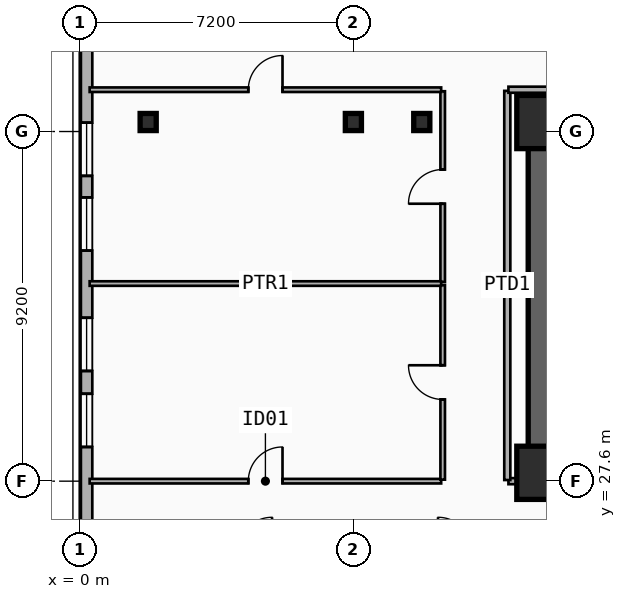
"""IFC4 building model, lengths in metres.
Left out: names, types, materials, properties, quantities, classifications, styles, units other than length and angle.
Written with IfcOpenShell. Run it as: python <this file> out.ifc"""

import sys

from ifc_helpers import new_model, si_unit, direction, frame, frame_2d, origin, origin_2d, place, context, subcontext, project, spatial, rectangle, i_section, extrude, element, fill, save


model = new_model("IFC4")
c1 = context("Model", 3, precision=1e-05, world=origin(), true_north=direction((0.0, 1.0)))
c2 = subcontext(c1, "Body", "Model", "MODEL_VIEW")
j1 = project(units=[si_unit("LENGTHUNIT", "METRE"), si_unit("PLANEANGLEUNIT", "RADIAN")], contexts=[c1])
p1 = place(None, origin())
s1 = spatial("IfcSite", under=j1, at=p1, CompositionType="ELEMENT")
p2 = place(p1, origin())
s2 = spatial("IfcBuilding", under=s1, at=p2, CompositionType="ELEMENT")
p3 = place(p2, frame((0.0, 0.0, 71.0)))
s3 = spatial("IfcBuildingStorey", under=s2, at=p3, CompositionType="ELEMENT", Elevation=71.0)
p4 = place(p3, frame((12.15, 37.05, 0.0), z_axis=(0.0, 0.0, 1.0), x_axis=(1.0, 0.0, 0.0)))
e1 = element("IfcWall", 1, at=p4, inside=s3, PredefinedType="SHEAR", context=c2, shape_type="SweptSolid", body=[
    extrude(rectangle(XDim=33.23, YDim=0.7, at=frame_2d((16.615, 0.0))), origin(), (0.0, 0.0, 1.0), 3.5),
])
p5 = place(p3, frame((21.18, 27.82, 0.0), z_axis=(0.0, 0.0, 1.0), x_axis=(-1.0, 0.0, 0.0)))
e2 = element("IfcWall", 2, at=p5, inside=s3, PredefinedType="SHEAR", context=c2, shape_type="SweptSolid", body=[
    extrude(rectangle(XDim=9.03, YDim=0.7, at=frame_2d((4.515, 0.0))), origin(), (0.0, 0.0, 1.0), 3.5),
])
p6 = place(p5, frame((2.68, 0.0, 0.0)))
e3 = element("IfcOpeningElement", 3, at=p6, cuts=e2, PredefinedType="OPENING", context=c2, shape_type="SweptSolid", body=[
    extrude(rectangle(XDim=1.1, YDim=2.15, at=frame_2d((0.55, 1.075))), frame((0.0, 0.36, 0.0), z_axis=(0.0, -1.0, 0.0), x_axis=(1.0, 0.0, 0.0)), (0.0, 0.0, 1.0), 0.72),
])
p7 = place(p3, frame((12.15, 28.17, 0.0), z_axis=(0.0, 0.0, 1.0), x_axis=(0.0, 1.0, 0.0)))
e4 = element("IfcWall", 4, at=p7, inside=s3, PredefinedType="SHEAR", context=c2, shape_type="SweptSolid", body=[
    extrude(rectangle(XDim=8.53, YDim=0.7, at=frame_2d((4.265, 0.0))), origin(), (0.0, 0.0, 1.0), 3.5),
])
for number, where, z_axis, x_axis in (
    (5, (12.2, 27.82, 0.0), (0.0, 0.0, 1.0), (1.0, 0.0, 0.0)),
    (6, (12.2, 37.05, 0.0), (0.0, 0.0, 1.0), (1.0, 0.0, 0.0)),
):
    element("IfcColumn", number, at=place(p3, frame(where, z_axis=z_axis, x_axis=x_axis)), inside=s3, PredefinedType="COLUMN", context=c2, shape_type="SweptSolid", body=[
        extrude(rectangle(XDim=1.4, YDim=1.4, at=origin_2d()), origin(), (0.0, 0.0, 1.0), 3.5),
    ])
for number, where, z_axis, x_axis in (
    (7, (9.0, 37.05, 0.0), (0.0, 0.0, 1.0), (1.0, 0.0, 0.0)),
    (8, (1.8, 37.05, 0.0), (0.0, 0.0, 1.0), (1.0, 0.0, 0.0)),
    (9, (7.2, 37.05, 0.0), (0.0, 0.0, 1.0), (1.0, 0.0, 0.0)),
):
    element("IfcColumn", number, at=place(p3, frame(where, z_axis=z_axis, x_axis=x_axis)), inside=s3, PredefinedType="COLUMN", context=c2, shape_type="SweptSolid", body=[
        extrude(i_section(OverallWidth=0.424, OverallDepth=0.45, WebThickness=0.041, FlangeThickness=0.065, FilletRadius=0.015, at=origin_2d()), origin(), (0.0, 0.0, 1.0), 3.5),
    ])
p8 = place(p3, frame((0.18, 25.8, 0.0), z_axis=(0.0, 0.0, 1.0), x_axis=(0.0, 1.0, 0.0)))
e10 = element("IfcWall", 10, at=p8, inside=s3, PredefinedType="SOLIDWALL", context=c2, shape_type="SweptSolid", body=[
    extrude(rectangle(XDim=15.2, YDim=0.3, at=frame_2d((7.6, 0.0))), origin(), (0.0, 0.0, 1.0), 3.18),
])
p9 = place(p8, frame((2.7, 0.0, 0.48)))
e11 = element("IfcOpeningElement", 11, at=p9, cuts=e10, PredefinedType="OPENING", context=c2, shape_type="SweptSolid", body=[
    extrude(rectangle(XDim=1.4, YDim=1.8, at=frame_2d((0.7, 0.9))), frame((0.0, 0.16, 0.0), z_axis=(0.0, -1.0, 0.0), x_axis=(1.0, 0.0, 0.0)), (0.0, 0.0, 1.0), 0.32),
])
p10 = place(p8, frame((4.7, 0.0, 0.48)))
e12 = element("IfcOpeningElement", 12, at=p10, cuts=e10, PredefinedType="OPENING", context=c2, shape_type="SweptSolid", body=[
    extrude(rectangle(XDim=1.4, YDim=1.8, at=frame_2d((0.7, 0.9))), frame((0.0, 0.16, 0.0), z_axis=(0.0, -1.0, 0.0), x_axis=(1.0, 0.0, 0.0)), (0.0, 0.0, 1.0), 0.32),
])
p11 = place(p8, frame((7.867, 0.0, 0.48)))
e13 = element("IfcOpeningElement", 13, at=p11, cuts=e10, PredefinedType="OPENING", context=c2, shape_type="SweptSolid", body=[
    extrude(rectangle(XDim=1.4, YDim=1.8, at=frame_2d((0.7, 0.9))), frame((0.0, 0.16, 0.0), z_axis=(0.0, -1.0, 0.0), x_axis=(1.0, 0.0, 0.0)), (0.0, 0.0, 1.0), 0.32),
])
p12 = place(p8, frame((9.833, 0.0, 0.48)))
e14 = element("IfcOpeningElement", 14, at=p12, cuts=e10, PredefinedType="OPENING", context=c2, shape_type="SweptSolid", body=[
    extrude(rectangle(XDim=1.4, YDim=1.8, at=frame_2d((0.7, 0.9))), frame((0.0, 0.16, 0.0), z_axis=(0.0, -1.0, 0.0), x_axis=(1.0, 0.0, 0.0)), (0.0, 0.0, 1.0), 0.32),
])
p13 = place(p3, frame((0.26, 27.6, 0.0), z_axis=(0.0, 0.0, 1.0), x_axis=(1.0, 0.0, 0.0)))
e15 = element("IfcWall", 15, at=p13, inside=s3, PredefinedType="PARTITIONING", context=c2, shape_type="SweptSolid", body=[
    extrude(rectangle(XDim=9.25, YDim=0.12, at=frame_2d((4.625, 0.0))), origin(), (0.0, 0.0, 1.0), 2.51),
])
p14 = place(p13, frame((4.175, 0.0, 0.0)))
e16 = element("IfcOpeningElement", 16, at=p14, cuts=e15, PredefinedType="OPENING", context=c2, shape_type="SweptSolid", body=[
    extrude(rectangle(XDim=0.9, YDim=2.1, at=frame_2d((0.45, 1.05))), frame((0.0, 0.07, 0.0), z_axis=(0.0, -1.0, 0.0), x_axis=(1.0, 0.0, 0.0)), (0.0, 0.0, 1.0), 0.14),
])
p15 = place(p3, frame((9.55, 27.64, 0.0), z_axis=(0.0, 0.0, 1.0), x_axis=(0.0, 1.0, 0.0)))
e17 = element("IfcWall", 17, at=p15, inside=s3, PredefinedType="PARTITIONING", context=c2, shape_type="SweptSolid", body=[
    extrude(rectangle(XDim=5.12, YDim=0.12, at=frame_2d((2.56, 0.0))), origin(), (0.0, 0.0, 1.0), 3.18),
])
p16 = place(p15, frame((2.11, 0.0, 0.0)))
e18 = element("IfcOpeningElement", 18, at=p16, cuts=e17, PredefinedType="OPENING", context=c2, shape_type="SweptSolid", body=[
    extrude(rectangle(XDim=0.9, YDim=2.1, at=frame_2d((0.45, 1.05))), frame((0.0, 0.07, 0.0), z_axis=(0.0, -1.0, 0.0), x_axis=(1.0, 0.0, 0.0)), (0.0, 0.0, 1.0), 0.14),
])
p17 = place(p3, frame((9.55, 32.84, 0.0), z_axis=(0.0, 0.0, 1.0), x_axis=(0.0, 1.0, 0.0)))
e19 = element("IfcWall", 19, at=p17, inside=s3, PredefinedType="PARTITIONING", context=c2, shape_type="SweptSolid", body=[
    extrude(rectangle(XDim=5.02, YDim=0.12, at=frame_2d((2.51, 0.0))), origin(), (0.0, 0.0, 1.0), 2.66),
])
p18 = place(p17, frame((2.06, 0.0, 0.0)))
e20 = element("IfcOpeningElement", 20, at=p18, cuts=e19, PredefinedType="OPENING", context=c2, shape_type="SweptSolid", body=[
    extrude(rectangle(XDim=0.9, YDim=2.1, at=frame_2d((0.45, 1.05))), frame((0.0, 0.07, 0.0), z_axis=(0.0, -1.0, 0.0), x_axis=(1.0, 0.0, 0.0)), (0.0, 0.0, 1.0), 0.14),
])
p19 = place(p3, frame((0.26, 37.9, 0.0), z_axis=(0.0, 0.0, 1.0), x_axis=(1.0, 0.0, 0.0)))
e21 = element("IfcWall", 21, at=p19, inside=s3, PredefinedType="PARTITIONING", context=c2, shape_type="SweptSolid", body=[
    extrude(rectangle(XDim=9.25, YDim=0.12, at=frame_2d((4.625, 0.0))), origin(), (0.0, 0.0, 1.0), 3.18),
])
p20 = place(p19, frame((4.175, 0.0, 0.0)))
e22 = element("IfcOpeningElement", 22, at=p20, cuts=e21, PredefinedType="OPENING", context=c2, shape_type="SweptSolid", body=[
    extrude(rectangle(XDim=0.9, YDim=2.1, at=frame_2d((0.45, 1.05))), frame((0.0, 0.07, 0.0), z_axis=(0.0, -1.0, 0.0), x_axis=(1.0, 0.0, 0.0)), (0.0, 0.0, 1.0), 0.14),
])
p21 = place(p3, frame((0.26, 32.8, 0.0), z_axis=(0.0, 0.0, 1.0), x_axis=(1.0, 0.0, 0.0)))
e23 = element("IfcWall", 23, at=p21, inside=s3, PredefinedType="PARTITIONING", context=c2, shape_type="SweptSolid", body=[
    extrude(rectangle(XDim=9.25, YDim=0.12, at=frame_2d((4.625, 0.0))), origin(), (0.0, 0.0, 1.0), 2.51),
])
p22 = place(p3, frame((11.28, 27.6, 0.0), z_axis=(0.0, 0.0, 1.0), x_axis=(1.0, 0.0, 0.0)))
e24 = element("IfcWall", 24, at=p22, inside=s3, PredefinedType="PARTITIONING", context=c2, shape_type="SweptSolid", body=[
    extrude(rectangle(XDim=0.84, YDim=0.16, at=frame_2d((0.42, 0.0))), origin(), (0.0, 0.0, 1.0), 2.28),
])
p23 = place(p3, frame((11.25, 27.63, 0.0), z_axis=(0.0, 0.0, 1.0), x_axis=(0.0, 1.0, 0.0)))
e25 = element("IfcWall", 25, at=p23, inside=s3, PredefinedType="PARTITIONING", context=c2, shape_type="SweptSolid", body=[
    extrude(rectangle(XDim=10.24, YDim=0.16, at=frame_2d((5.12, 0.0))), origin(), (0.0, 0.0, 1.0), 2.66),
])
p24 = place(p3, frame((11.28, 37.9, 0.0), z_axis=(0.0, 0.0, 1.0), x_axis=(1.0, 0.0, 0.0)))
e26 = element("IfcWall", 26, at=p24, inside=s3, PredefinedType="PARTITIONING", context=c2, shape_type="SweptSolid", body=[
    extrude(rectangle(XDim=35.04, YDim=0.16, at=frame_2d((17.52, 0.0))), origin(), (0.0, 0.0, 1.0), 3.18),
])
p25 = place(p9, origin())
e27 = element("IfcWindow", 27, at=p25, inside=s3, PartitioningType="SINGLE_PANEL", PredefinedType="WINDOW", context=c2, shape_type="SweptSolid", body=[
    extrude(rectangle(XDim=1.4, YDim=1.8, at=frame_2d((0.7, 0.9))), frame((0.0, 0.03, 0.0), z_axis=(0.0, -1.0, 0.0), x_axis=(1.0, 0.0, 0.0)), (0.0, 0.0, 1.0), 0.06),
])
fill(e11, e27)
p26 = place(p10, origin())
e28 = element("IfcWindow", 28, at=p26, inside=s3, PartitioningType="SINGLE_PANEL", PredefinedType="WINDOW", context=c2, shape_type="SweptSolid", body=[
    extrude(rectangle(XDim=1.4, YDim=1.8, at=frame_2d((0.7, 0.9))), frame((0.0, 0.03, 0.0), z_axis=(0.0, -1.0, 0.0), x_axis=(1.0, 0.0, 0.0)), (0.0, 0.0, 1.0), 0.06),
])
fill(e12, e28)
p27 = place(p11, origin())
e29 = element("IfcWindow", 29, at=p27, inside=s3, PartitioningType="SINGLE_PANEL", PredefinedType="WINDOW", context=c2, shape_type="SweptSolid", body=[
    extrude(rectangle(XDim=1.4, YDim=1.8, at=frame_2d((0.7, 0.9))), frame((0.0, 0.03, 0.0), z_axis=(0.0, -1.0, 0.0), x_axis=(1.0, 0.0, 0.0)), (0.0, 0.0, 1.0), 0.06),
])
fill(e13, e29)
p28 = place(p12, origin())
e30 = element("IfcWindow", 30, at=p28, inside=s3, PartitioningType="SINGLE_PANEL", PredefinedType="WINDOW", context=c2, shape_type="SweptSolid", body=[
    extrude(rectangle(XDim=1.4, YDim=1.8, at=frame_2d((0.7, 0.9))), frame((0.0, 0.03, 0.0), z_axis=(0.0, -1.0, 0.0), x_axis=(1.0, 0.0, 0.0)), (0.0, 0.0, 1.0), 0.06),
])
fill(e14, e30)
p29 = place(p14, origin())
e31 = element("IfcDoor", 31, at=p29, inside=s3, OperationType="SINGLE_SWING_RIGHT", PredefinedType="DOOR", context=c2, shape_type="SweptSolid", body=[
    extrude(rectangle(XDim=0.9, YDim=2.1, at=frame_2d((0.45, 1.05))), frame((0.0, 0.025, 0.0), z_axis=(0.0, -1.0, 0.0), x_axis=(1.0, 0.0, 0.0)), (0.0, 0.0, 1.0), 0.05),
])
fill(e16, e31)
p30 = place(p16, origin())
e32 = element("IfcDoor", 32, at=p30, inside=s3, OperationType="SINGLE_SWING_RIGHT", PredefinedType="DOOR", context=c2, shape_type="SweptSolid", body=[
    extrude(rectangle(XDim=0.9, YDim=2.1, at=frame_2d((0.45, 1.05))), frame((0.0, 0.025, 0.0), z_axis=(0.0, -1.0, 0.0), x_axis=(1.0, 0.0, 0.0)), (0.0, 0.0, 1.0), 0.05),
])
fill(e18, e32)
p31 = place(p18, origin())
e33 = element("IfcDoor", 33, at=p31, inside=s3, OperationType="SINGLE_SWING_LEFT", PredefinedType="DOOR", context=c2, shape_type="SweptSolid", body=[
    extrude(rectangle(XDim=0.9, YDim=2.1, at=frame_2d((0.45, 1.05))), frame((0.0, 0.025, 0.0), z_axis=(0.0, -1.0, 0.0), x_axis=(1.0, 0.0, 0.0)), (0.0, 0.0, 1.0), 0.05),
])
fill(e20, e33)
p32 = place(p20, origin())
e34 = element("IfcDoor", 34, at=p32, inside=s3, OperationType="SINGLE_SWING_RIGHT", PredefinedType="DOOR", context=c2, shape_type="SweptSolid", body=[
    extrude(rectangle(XDim=0.9, YDim=2.1, at=frame_2d((0.45, 1.05))), frame((0.0, 0.025, 0.0), z_axis=(0.0, -1.0, 0.0), x_axis=(1.0, 0.0, 0.0)), (0.0, 0.0, 1.0), 0.05),
])
fill(e22, e34)
save(model, sys.argv[1])
